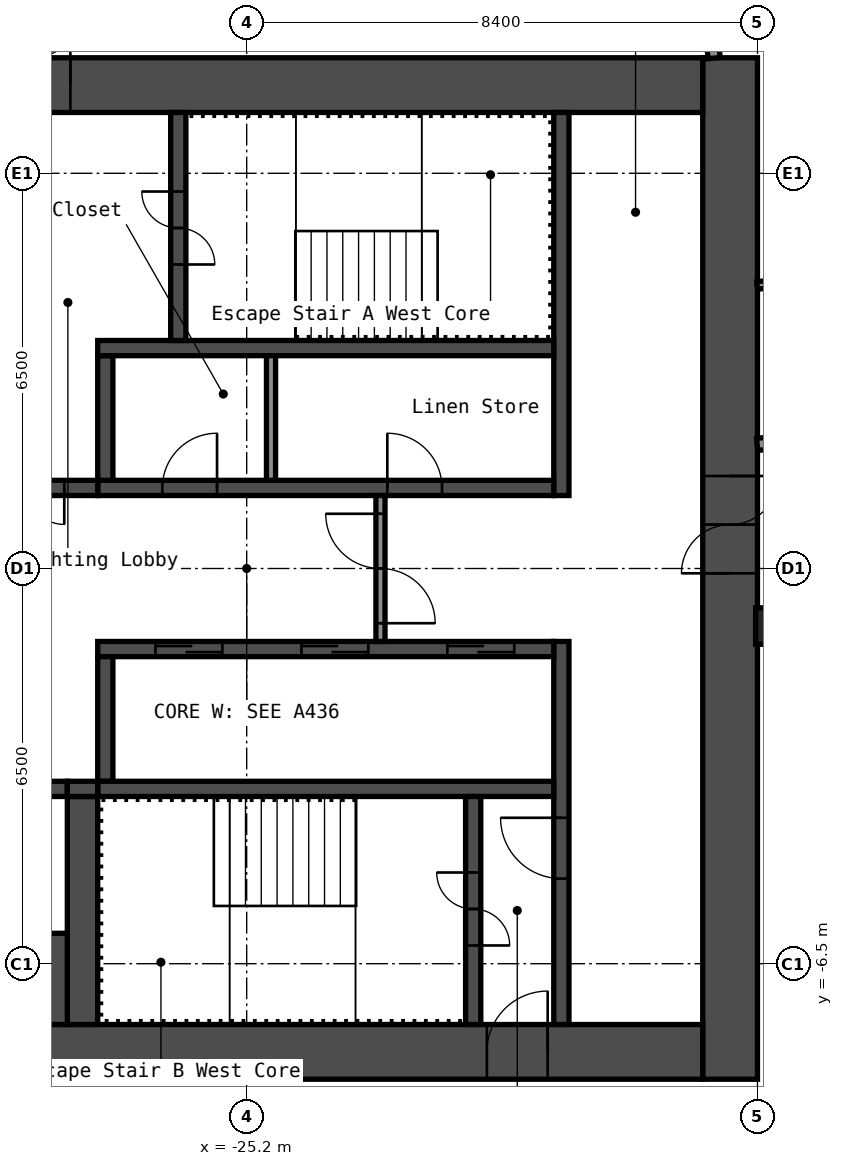
"""IFC4 building model, lengths in metres.
Left out: names, types, materials, properties, quantities, classifications, styles, units other than length and angle.
Written with IfcOpenShell. Run it as: python <this file> out.ifc"""

import sys

from ifc_helpers import new_model, si_unit, direction, frame, frame_2d, origin, origin_2d, place, context, subcontext, project, spatial, rectangle, hollow_rectangle, extrude, element, fill, save


model = new_model("IFC4")
c1 = context("Model", 3, precision=1e-05, world=origin(), true_north=direction((0.0, 1.0)))
c2 = subcontext(c1, "Body", "Model", "MODEL_VIEW")
j1 = project(units=[si_unit("LENGTHUNIT", "METRE"), si_unit("PLANEANGLEUNIT", "RADIAN")], contexts=[c1])
p1 = place(None, origin())
s1 = spatial("IfcSite", under=j1, at=p1, CompositionType="ELEMENT")
p2 = place(p1, origin())
s2 = spatial("IfcBuilding", under=s1, at=p2, CompositionType="ELEMENT")
p3 = place(p2, frame((0.0, 0.0, 255.0)))
s3 = spatial("IfcBuildingStorey", under=s2, at=p3, CompositionType="ELEMENT", Elevation=255.0)
p4 = place(p3, frame((-16.53, -0.947, 0.0), z_axis=(0.0, 0.0, 1.0), x_axis=(1.0, 0.0, 0.0)))
e1 = element("IfcColumn", 1, at=p4, inside=s3, PredefinedType="COLUMN", context=c2, shape_type="SweptSolid", body=[
    extrude(hollow_rectangle(XDim=0.6, YDim=0.6, WallThickness=0.025, InnerFilletRadius=0.038, OuterFilletRadius=0.062, at=origin_2d()), origin(), (0.0, 0.0, 1.0), 2.75),
])
p5 = place(p3, frame((-17.25, -8.4, 0.0), z_axis=(0.0, 0.0, 1.0), x_axis=(0.0, 1.0, 0.0)))
e2 = element("IfcWall", 2, at=p5, inside=s3, PredefinedType="SHEAR", context=c2, shape_type="SweptSolid", body=[
    extrude(rectangle(XDim=16.8, YDim=0.9, at=frame_2d((8.4, 0.0))), origin(), (0.0, 0.0, 1.0), 2.75),
])
p6 = place(p5, frame((8.321, 0.0, 0.0)))
e3 = element("IfcOpeningElement", 3, at=p6, cuts=e2, PredefinedType="OPENING", context=c2, shape_type="SweptSolid", body=[
    extrude(rectangle(XDim=1.6, YDim=2.1, at=frame_2d((0.8, 1.05))), frame((0.0, 0.46, 0.0), z_axis=(0.0, -1.0, 0.0), x_axis=(1.0, 0.0, 0.0)), (0.0, 0.0, 1.0), 0.92),
])
p7 = place(p3, frame((-32.7, 7.95, 0.0), z_axis=(0.0, 0.0, 1.0), x_axis=(1.0, 0.0, 0.0)))
e4 = element("IfcWall", 4, at=p7, inside=s3, PredefinedType="SHEAR", context=c2, shape_type="SweptSolid", body=[
    extrude(rectangle(XDim=15.0, YDim=0.9, at=frame_2d((7.5, 0.0))), origin(), (0.0, 0.0, 1.0), 2.75),
])
p8 = place(p7, frame((3.4, 0.0, 0.0)))
e5 = element("IfcOpeningElement", 5, at=p8, cuts=e4, PredefinedType="OPENING", context=c2, shape_type="SweptSolid", body=[
    extrude(rectangle(XDim=1.2, YDim=2.1, at=frame_2d((0.6, 1.05))), frame((0.0, 0.46, 0.0), z_axis=(0.0, -1.0, 0.0), x_axis=(1.0, 0.0, 0.0)), (0.0, 0.0, 1.0), 0.92),
])
p9 = place(p7, frame((0.75, 0.0, 0.0)))
e6 = element("IfcOpeningElement", 6, at=p9, cuts=e4, PredefinedType="OPENING", context=c2, shape_type="SweptSolid", body=[
    extrude(rectangle(XDim=0.9, YDim=2.1, at=frame_2d((0.45, 1.05))), frame((0.0, 0.46, 0.0), z_axis=(0.0, -1.0, 0.0), x_axis=(1.0, 0.0, 0.0)), (0.0, 0.0, 1.0), 0.92),
])
p10 = place(p3, frame((-32.7, -7.95, 0.0), z_axis=(0.0, 0.0, 1.0), x_axis=(1.0, 0.0, 0.0)))
e7 = element("IfcWall", 7, at=p10, inside=s3, PredefinedType="SHEAR", context=c2, shape_type="SweptSolid", body=[
    extrude(rectangle(XDim=15.0, YDim=0.9, at=frame_2d((7.5, 0.0))), origin(), (0.0, 0.0, 1.0), 2.75),
])
p11 = place(p10, frame((11.45, 0.0, 0.0)))
e8 = element("IfcOpeningElement", 8, at=p11, cuts=e7, PredefinedType="OPENING", context=c2, shape_type="SweptSolid", body=[
    extrude(rectangle(XDim=1.0, YDim=2.1, at=frame_2d((0.5, 1.05))), frame((0.0, 0.46, 0.0), z_axis=(0.0, -1.0, 0.0), x_axis=(1.0, 0.0, 0.0)), (0.0, 0.0, 1.0), 0.92),
])
p12 = place(p3, frame((-20.025, 1.2, 0.0), z_axis=(0.0, 0.0, 1.0), x_axis=(0.0, 1.0, 0.0)))
e9 = element("IfcWall", 9, at=p12, inside=s3, PredefinedType="SHEAR", context=c2, shape_type="SweptSolid", body=[
    extrude(rectangle(XDim=6.3, YDim=0.25, at=frame_2d((3.15, 0.0))), origin(), (0.0, 0.0, 1.0), 2.75),
])
p13 = place(p3, frame((-20.025, -7.5, 0.0), z_axis=(0.0, 0.0, 1.0), x_axis=(0.0, 1.0, 0.0)))
e10 = element("IfcWall", 10, at=p13, inside=s3, PredefinedType="SHEAR", context=c2, shape_type="SweptSolid", body=[
    extrude(rectangle(XDim=6.3, YDim=0.25, at=frame_2d((3.15, 0.0))), origin(), (0.0, 0.0, 1.0), 2.75),
])
p14 = place(p13, frame((2.4, 0.0, 0.0)))
e11 = element("IfcOpeningElement", 11, at=p14, cuts=e10, PredefinedType="OPENING", context=c2, shape_type="SweptSolid", body=[
    extrude(rectangle(XDim=1.0, YDim=2.1, at=frame_2d((0.5, 1.05))), frame((0.0, 0.135, 0.0), z_axis=(0.0, -1.0, 0.0), x_axis=(1.0, 0.0, 0.0)), (0.0, 0.0, 1.0), 0.27),
])
p15 = place(p3, frame((-27.65, 1.325, 0.0), z_axis=(0.0, 0.0, 1.0), x_axis=(1.0, 0.0, 0.0)))
e12 = element("IfcWall", 12, at=p15, inside=s3, PredefinedType="SHEAR", context=c2, shape_type="SweptSolid", body=[
    extrude(rectangle(XDim=7.5, YDim=0.25, at=frame_2d((3.75, 0.0))), origin(), (0.0, 0.0, 1.0), 2.75),
])
p16 = place(p15, frame((4.762, 0.0, 0.0)))
e13 = element("IfcOpeningElement", 13, at=p16, cuts=e12, PredefinedType="OPENING", context=c2, shape_type="SweptSolid", body=[
    extrude(rectangle(XDim=0.9, YDim=2.1, at=frame_2d((0.45, 1.05))), frame((0.0, 0.135, 0.0), z_axis=(0.0, -1.0, 0.0), x_axis=(1.0, 0.0, 0.0)), (0.0, 0.0, 1.0), 0.27),
])
p17 = place(p15, frame((1.062, 0.0, 0.0)))
e14 = element("IfcOpeningElement", 14, at=p17, cuts=e12, PredefinedType="OPENING", context=c2, shape_type="SweptSolid", body=[
    extrude(rectangle(XDim=0.9, YDim=2.1, at=frame_2d((0.45, 1.05))), frame((0.0, 0.135, 0.0), z_axis=(0.0, -1.0, 0.0), x_axis=(1.0, 0.0, 0.0)), (0.0, 0.0, 1.0), 0.27),
])
p18 = place(p3, frame((-27.525, 1.45, 0.0), z_axis=(0.0, 0.0, 1.0), x_axis=(0.0, 1.0, 0.0)))
e15 = element("IfcWall", 15, at=p18, inside=s3, PredefinedType="SHEAR", context=c2, shape_type="SweptSolid", body=[
    extrude(rectangle(XDim=2.05, YDim=0.25, at=frame_2d((1.025, 0.0))), origin(), (0.0, 0.0, 1.0), 2.75),
])
p19 = place(p3, frame((-27.65, 3.625, 0.0), z_axis=(0.0, 0.0, 1.0), x_axis=(1.0, 0.0, 0.0)))
e16 = element("IfcWall", 16, at=p19, inside=s3, PredefinedType="SHEAR", context=c2, shape_type="SweptSolid", body=[
    extrude(rectangle(XDim=7.5, YDim=0.25, at=frame_2d((3.75, 0.0))), origin(), (0.0, 0.0, 1.0), 2.75),
])
p20 = place(p3, frame((-26.325, 3.75, 0.0), z_axis=(0.0, 0.0, 1.0), x_axis=(0.0, 1.0, 0.0)))
e17 = element("IfcWall", 17, at=p20, inside=s3, PredefinedType="SHEAR", context=c2, shape_type="SweptSolid", body=[
    extrude(rectangle(XDim=3.75, YDim=0.25, at=frame_2d((1.875, 0.0))), origin(), (0.0, 0.0, 1.0), 2.75),
])
p21 = place(p20, frame((1.25, 0.0, 0.0)))
e18 = element("IfcOpeningElement", 18, at=p21, cuts=e17, PredefinedType="OPENING", context=c2, shape_type="SweptSolid", body=[
    extrude(rectangle(XDim=1.2, YDim=2.1, at=frame_2d((0.6, 1.05))), frame((0.0, 0.135, 0.0), z_axis=(0.0, -1.0, 0.0), x_axis=(1.0, 0.0, 0.0)), (0.0, 0.0, 1.0), 0.27),
])
p22 = place(p3, frame((-32.7, 1.325, 0.0), z_axis=(0.0, 0.0, 1.0), x_axis=(1.0, 0.0, 0.0)))
e19 = element("IfcWall", 19, at=p22, inside=s3, PredefinedType="SHEAR", context=c2, shape_type="SweptSolid", body=[
    extrude(rectangle(XDim=5.05, YDim=0.25, at=frame_2d((2.525, 0.0))), origin(), (0.0, 0.0, 1.0), 2.75),
])
p23 = place(p22, frame((3.3, 0.0, 0.0)))
e20 = element("IfcOpeningElement", 20, at=p23, cuts=e19, PredefinedType="OPENING", context=c2, shape_type="SweptSolid", body=[
    extrude(rectangle(XDim=1.2, YDim=2.1, at=frame_2d((0.6, 1.05))), frame((0.0, 0.135, 0.0), z_axis=(0.0, -1.0, 0.0), x_axis=(1.0, 0.0, 0.0)), (0.0, 0.0, 1.0), 0.27),
])
p24 = place(p3, frame((-27.65, -1.325, 0.0), z_axis=(0.0, 0.0, 1.0), x_axis=(1.0, 0.0, 0.0)))
e21 = element("IfcWall", 21, at=p24, inside=s3, PredefinedType="SHEAR", context=c2, shape_type="SweptSolid", body=[
    extrude(rectangle(XDim=7.5, YDim=0.25, at=frame_2d((3.75, 0.0))), origin(), (0.0, 0.0, 1.0), 2.75),
])
p25 = place(p24, frame((5.75, 0.0, 0.0)))
e22 = element("IfcOpeningElement", 22, at=p25, cuts=e21, PredefinedType="OPENING", context=c2, shape_type="SweptSolid", body=[
    extrude(rectangle(XDim=1.1, YDim=2.1, at=frame_2d((0.55, 1.05))), frame((0.0, 0.135, 0.0), z_axis=(0.0, -1.0, 0.0), x_axis=(1.0, 0.0, 0.0)), (0.0, 0.0, 1.0), 0.27),
])
p26 = place(p24, frame((3.35, 0.0, 0.0)))
e23 = element("IfcOpeningElement", 23, at=p26, cuts=e21, PredefinedType="OPENING", context=c2, shape_type="SweptSolid", body=[
    extrude(rectangle(XDim=1.1, YDim=2.1, at=frame_2d((0.55, 1.05))), frame((0.0, 0.135, 0.0), z_axis=(0.0, -1.0, 0.0), x_axis=(1.0, 0.0, 0.0)), (0.0, 0.0, 1.0), 0.27),
])
p27 = place(p24, frame((0.95, 0.0, 0.0)))
e24 = element("IfcOpeningElement", 24, at=p27, cuts=e21, PredefinedType="OPENING", context=c2, shape_type="SweptSolid", body=[
    extrude(rectangle(XDim=1.1, YDim=2.1, at=frame_2d((0.55, 1.05))), frame((0.0, 0.135, 0.0), z_axis=(0.0, -1.0, 0.0), x_axis=(1.0, 0.0, 0.0)), (0.0, 0.0, 1.0), 0.27),
])
p28 = place(p3, frame((-27.525, -3.5, 0.0), z_axis=(0.0, 0.0, 1.0), x_axis=(0.0, 1.0, 0.0)))
e25 = element("IfcWall", 25, at=p28, inside=s3, PredefinedType="SHEAR", context=c2, shape_type="SweptSolid", body=[
    extrude(rectangle(XDim=2.05, YDim=0.25, at=frame_2d((1.025, 0.0))), origin(), (0.0, 0.0, 1.0), 2.75),
])
p29 = place(p3, frame((-27.65, -3.625, 0.0), z_axis=(0.0, 0.0, 1.0), x_axis=(1.0, 0.0, 0.0)))
e26 = element("IfcWall", 26, at=p29, inside=s3, PredefinedType="SHEAR", context=c2, shape_type="SweptSolid", body=[
    extrude(rectangle(XDim=7.5, YDim=0.25, at=frame_2d((3.75, 0.0))), origin(), (0.0, 0.0, 1.0), 2.75),
])
p30 = place(p3, frame((-21.475, -7.5, 0.0), z_axis=(0.0, 0.0, 1.0), x_axis=(0.0, 1.0, 0.0)))
e27 = element("IfcWall", 27, at=p30, inside=s3, PredefinedType="SHEAR", context=c2, shape_type="SweptSolid", body=[
    extrude(rectangle(XDim=3.75, YDim=0.25, at=frame_2d((1.875, 0.0))), origin(), (0.0, 0.0, 1.0), 2.75),
])
p31 = place(p30, frame((1.3, 0.0, 0.0)))
e28 = element("IfcOpeningElement", 28, at=p31, cuts=e27, PredefinedType="OPENING", context=c2, shape_type="SweptSolid", body=[
    extrude(rectangle(XDim=1.2, YDim=2.1, at=frame_2d((0.6, 1.05))), frame((0.0, 0.135, 0.0), z_axis=(0.0, -1.0, 0.0), x_axis=(1.0, 0.0, 0.0)), (0.0, 0.0, 1.0), 0.27),
])
p32 = place(p3, frame((-27.9, -7.5, 0.0), z_axis=(0.0, 0.0, 1.0), x_axis=(0.0, 1.0, 0.0)))
e29 = element("IfcWall", 29, at=p32, inside=s3, PredefinedType="SHEAR", context=c2, shape_type="SweptSolid", body=[
    extrude(rectangle(XDim=3.75, YDim=0.5, at=frame_2d((1.875, 0.0))), origin(), (0.0, 0.0, 1.0), 2.75),
])
p33 = place(p3, frame((-32.7, -3.625, 0.0), z_axis=(0.0, 0.0, 1.0), x_axis=(1.0, 0.0, 0.0)))
e30 = element("IfcWall", 30, at=p33, inside=s3, PredefinedType="SHEAR", context=c2, shape_type="SweptSolid", body=[
    extrude(rectangle(XDim=4.55, YDim=0.25, at=frame_2d((2.275, 0.0))), origin(), (0.0, 0.0, 1.0), 2.75),
])
p34 = place(p33, frame((2.85, 0.0, 0.0)))
e31 = element("IfcOpeningElement", 31, at=p34, cuts=e30, PredefinedType="OPENING", context=c2, shape_type="SweptSolid", body=[
    extrude(rectangle(XDim=1.1, YDim=2.1, at=frame_2d((0.55, 1.05))), frame((0.0, 0.135, 0.0), z_axis=(0.0, -1.0, 0.0), x_axis=(1.0, 0.0, 0.0)), (0.0, 0.0, 1.0), 0.27),
])
p35 = place(p33, frame((0.6, 0.0, 0.0)))
e32 = element("IfcOpeningElement", 32, at=p35, cuts=e30, PredefinedType="OPENING", context=c2, shape_type="SweptSolid", body=[
    extrude(rectangle(XDim=1.1, YDim=2.1, at=frame_2d((0.55, 1.05))), frame((0.0, 0.135, 0.0), z_axis=(0.0, -1.0, 0.0), x_axis=(1.0, 0.0, 0.0)), (0.0, 0.0, 1.0), 0.27),
])
p36 = place(p3, frame((-32.7, -6.75, 0.0), z_axis=(0.0, 0.0, 1.0), x_axis=(1.0, 0.0, 0.0)))
e33 = element("IfcWall", 33, at=p36, inside=s3, PredefinedType="SHEAR", context=c2, shape_type="SweptSolid", body=[
    extrude(rectangle(XDim=4.55, YDim=1.5, at=frame_2d((2.275, 0.0))), origin(), (0.0, 0.0, 1.0), 2.75),
])
p37 = place(p3, frame((-28.15, -3.625, 0.0), z_axis=(0.0, 0.0, 1.0), x_axis=(1.0, 0.0, 0.0)))
e34 = element("IfcWall", 34, at=p37, inside=s3, PredefinedType="SHEAR", context=c2, shape_type="SweptSolid", body=[
    extrude(rectangle(XDim=0.5, YDim=0.25, at=frame_2d((0.25, 0.0))), origin(), (0.0, 0.0, 1.0), 2.75),
])
p38 = place(p3, frame((-23.0, -1.2, 0.0), z_axis=(0.0, 0.0, 1.0), x_axis=(0.0, 1.0, 0.0)))
e35 = element("IfcWall", 35, at=p38, inside=s3, PredefinedType="PARTITIONING", context=c2, shape_type="SweptSolid", body=[
    extrude(rectangle(XDim=2.4, YDim=0.15, at=frame_2d((1.2, 0.0))), origin(), (0.0, 0.0, 1.0), 2.75),
])
p39 = place(p38, frame((0.3, 0.0, 0.0)))
e36 = element("IfcOpeningElement", 36, at=p39, cuts=e35, PredefinedType="OPENING", context=c2, shape_type="SweptSolid", body=[
    extrude(rectangle(XDim=1.8, YDim=2.1, at=frame_2d((0.9, 1.05))), frame((0.0, 0.085, 0.0), z_axis=(0.0, -1.0, 0.0), x_axis=(1.0, 0.0, 0.0)), (0.0, 0.0, 1.0), 0.17),
])
p40 = place(p3, frame((-24.8, 1.45, 0.0), z_axis=(0.0, 0.0, 1.0), x_axis=(0.0, 1.0, 0.0)))
e37 = element("IfcWall", 37, at=p40, inside=s3, PredefinedType="PARTITIONING", context=c2, shape_type="SweptSolid", body=[
    extrude(rectangle(XDim=2.05, YDim=0.15, at=frame_2d((1.025, 0.0))), origin(), (0.0, 0.0, 1.0), 2.75),
])
p41 = place(p3, frame((-16.805, 2.041, 0.0), z_axis=(0.0, 0.0, 1.0), x_axis=(0.994521146831, 0.104535584879, 0.0)))
e38 = element("IfcWall", 38, at=p41, inside=s3, PredefinedType="PARTITIONING", context=c2, shape_type="SweptSolid", body=[
    extrude(rectangle(XDim=33.561, YDim=0.2, at=frame_2d((16.78, 0.0))), origin(), (0.0, 0.0, 1.0), 2.75),
])
p42 = place(p41, frame((4.161, 0.0, 0.0)))
e39 = element("IfcOpeningElement", 39, at=p42, cuts=e38, PredefinedType="OPENING", context=c2, shape_type="SweptSolid", body=[
    extrude(rectangle(XDim=1.6, YDim=2.1, at=frame_2d((0.8, 1.05))), frame((0.0, 0.11, 0.0), z_axis=(0.0, -1.0, 0.0), x_axis=(1.0, 0.0, 0.0)), (0.0, 0.0, 1.0), 0.22),
])
p43 = place(p41, frame((10.431, 0.0, 0.0)))
e40 = element("IfcOpeningElement", 40, at=p43, cuts=e38, PredefinedType="OPENING", context=c2, shape_type="SweptSolid", body=[
    extrude(rectangle(XDim=0.9, YDim=2.1, at=frame_2d((0.45, 1.05))), frame((0.0, 0.11, 0.0), z_axis=(0.0, -1.0, 0.0), x_axis=(1.0, 0.0, 0.0)), (0.0, 0.0, 1.0), 0.22),
])
p44 = place(p41, frame((14.631, 0.0, 0.0)))
e41 = element("IfcOpeningElement", 41, at=p44, cuts=e38, PredefinedType="OPENING", context=c2, shape_type="SweptSolid", body=[
    extrude(rectangle(XDim=0.9, YDim=2.1, at=frame_2d((0.45, 1.05))), frame((0.0, 0.11, 0.0), z_axis=(0.0, -1.0, 0.0), x_axis=(1.0, 0.0, 0.0)), (0.0, 0.0, 1.0), 0.22),
])
p45 = place(p41, frame((19.611, 0.0, 0.0)))
e42 = element("IfcOpeningElement", 42, at=p45, cuts=e38, PredefinedType="OPENING", context=c2, shape_type="SweptSolid", body=[
    extrude(rectangle(XDim=1.0, YDim=2.1, at=frame_2d((0.5, 1.05))), frame((0.0, 0.11, 0.0), z_axis=(0.0, -1.0, 0.0), x_axis=(1.0, 0.0, 0.0)), (0.0, 0.0, 1.0), 0.22),
])
p46 = place(p41, frame((21.311, 0.0, 0.0)))
e43 = element("IfcOpeningElement", 43, at=p46, cuts=e38, PredefinedType="OPENING", context=c2, shape_type="SweptSolid", body=[
    extrude(rectangle(XDim=1.0, YDim=2.1, at=frame_2d((0.5, 1.05))), frame((0.0, 0.11, 0.0), z_axis=(0.0, -1.0, 0.0), x_axis=(1.0, 0.0, 0.0)), (0.0, 0.0, 1.0), 0.22),
])
p47 = place(p41, frame((26.221, 0.0, 0.0)))
e44 = element("IfcOpeningElement", 44, at=p47, cuts=e38, PredefinedType="OPENING", context=c2, shape_type="SweptSolid", body=[
    extrude(rectangle(XDim=0.9, YDim=2.1, at=frame_2d((0.45, 1.05))), frame((0.0, 0.11, 0.0), z_axis=(0.0, -1.0, 0.0), x_axis=(1.0, 0.0, 0.0)), (0.0, 0.0, 1.0), 0.22),
])
p48 = place(p41, frame((30.421, 0.0, 0.0)))
e45 = element("IfcOpeningElement", 45, at=p48, cuts=e38, PredefinedType="OPENING", context=c2, shape_type="SweptSolid", body=[
    extrude(rectangle(XDim=0.9, YDim=2.1, at=frame_2d((0.45, 1.05))), frame((0.0, 0.11, 0.0), z_axis=(0.0, -1.0, 0.0), x_axis=(1.0, 0.0, 0.0)), (0.0, 0.0, 1.0), 0.22),
])
p49 = place(p3, frame((-16.805, 4.655, 0.0), z_axis=(0.0, 0.0, 1.0), x_axis=(0.994521955988, 0.104527886512, 0.0)))
e46 = element("IfcWall", 46, at=p49, inside=s3, PredefinedType="PARTITIONING", context=c2, shape_type="SweptSolid", body=[
    extrude(rectangle(XDim=2.025, YDim=0.125, at=frame_2d((1.012, 0.0))), origin(), (0.0, 0.0, 1.0), 2.75),
])
p50 = place(p3, frame((-17.512, 8.395, 0.0), z_axis=(0.0, 0.0, 1.0), x_axis=(-0.104524714473, 0.994522289375, 0.0)))
e47 = element("IfcWall", 47, at=p50, inside=s3, PredefinedType="PARTITIONING", context=c2, shape_type="SweptSolid", body=[
    extrude(rectangle(XDim=9.607, YDim=0.2, at=frame_2d((4.803, 0.0))), origin(), (0.0, 0.0, 1.0), 2.75),
])
p51 = place(p6, origin())
e48 = element("IfcDoor", 48, at=p51, inside=s3, OperationType="DOUBLE_DOOR_SINGLE_SWING", PredefinedType="DOOR", context=c2, shape_type="SweptSolid", body=[
    extrude(rectangle(XDim=1.6, YDim=2.1, at=frame_2d((0.8, 1.05))), frame((0.0, 0.025, 0.0), z_axis=(0.0, -1.0, 0.0), x_axis=(1.0, 0.0, 0.0)), (0.0, 0.0, 1.0), 0.05),
])
fill(e3, e48)
p52 = place(p8, origin())
e49 = element("IfcDoor", 49, at=p52, inside=s3, OperationType="DOUBLE_DOOR_SINGLE_SWING", PredefinedType="DOOR", context=c2, shape_type="SweptSolid", body=[
    extrude(rectangle(XDim=1.2, YDim=2.1, at=frame_2d((0.6, 1.05))), frame((0.0, 0.025, 0.0), z_axis=(0.0, -1.0, 0.0), x_axis=(1.0, 0.0, 0.0)), (0.0, 0.0, 1.0), 0.05),
])
fill(e5, e49)
p53 = place(p11, origin())
e50 = element("IfcDoor", 50, at=p53, inside=s3, OperationType="SINGLE_SWING_LEFT", PredefinedType="DOOR", context=c2, shape_type="SweptSolid", body=[
    extrude(rectangle(XDim=1.0, YDim=2.1, at=frame_2d((0.5, 1.05))), frame((0.0, 0.025, 0.0), z_axis=(0.0, -1.0, 0.0), x_axis=(1.0, 0.0, 0.0)), (0.0, 0.0, 1.0), 0.05),
])
fill(e8, e50)
p54 = place(p21, origin())
e51 = element("IfcDoor", 51, at=p54, inside=s3, OperationType="DOUBLE_DOOR_SINGLE_SWING", PredefinedType="DOOR", context=c2, shape_type="SweptSolid", body=[
    extrude(rectangle(XDim=1.2, YDim=2.1, at=frame_2d((0.6, 1.05))), frame((0.0, 0.025, 0.0), z_axis=(0.0, -1.0, 0.0), x_axis=(1.0, 0.0, 0.0)), (0.0, 0.0, 1.0), 0.05),
])
fill(e18, e51)
p55 = place(p31, origin())
e52 = element("IfcDoor", 52, at=p55, inside=s3, OperationType="DOUBLE_DOOR_SINGLE_SWING", PredefinedType="DOOR", context=c2, shape_type="SweptSolid", body=[
    extrude(rectangle(XDim=1.2, YDim=2.1, at=frame_2d((0.6, 1.05))), frame((0.0, 0.025, 0.0), z_axis=(0.0, -1.0, 0.0), x_axis=(1.0, 0.0, 0.0)), (0.0, 0.0, 1.0), 0.05),
])
fill(e28, e52)
p56 = place(p14, origin())
e53 = element("IfcDoor", 53, at=p56, inside=s3, OperationType="SINGLE_SWING_LEFT", PredefinedType="DOOR", context=c2, shape_type="SweptSolid", body=[
    extrude(rectangle(XDim=1.0, YDim=2.1, at=frame_2d((0.5, 1.05))), frame((0.0, 0.025, 0.0), z_axis=(0.0, -1.0, 0.0), x_axis=(1.0, 0.0, 0.0)), (0.0, 0.0, 1.0), 0.05),
])
fill(e11, e53)
p57 = place(p23, origin())
e54 = element("IfcDoor", 54, at=p57, inside=s3, OperationType="DOUBLE_DOOR_SINGLE_SWING", PredefinedType="DOOR", context=c2, shape_type="SweptSolid", body=[
    extrude(rectangle(XDim=1.2, YDim=2.1, at=frame_2d((0.6, 1.05))), frame((0.0, 0.025, 0.0), z_axis=(0.0, -1.0, 0.0), x_axis=(1.0, 0.0, 0.0)), (0.0, 0.0, 1.0), 0.05),
])
fill(e20, e54)
p58 = place(p39, origin())
e55 = element("IfcDoor", 55, at=p58, inside=s3, OperationType="DOUBLE_DOOR_SINGLE_SWING", PredefinedType="DOOR", context=c2, shape_type="SweptSolid", body=[
    extrude(rectangle(XDim=1.8, YDim=2.1, at=frame_2d((0.9, 1.05))), frame((0.0, 0.025, 0.0), z_axis=(0.0, -1.0, 0.0), x_axis=(1.0, 0.0, 0.0)), (0.0, 0.0, 1.0), 0.05),
])
fill(e36, e55)
p59 = place(p16, origin())
e56 = element("IfcDoor", 56, at=p59, inside=s3, OperationType="SINGLE_SWING_RIGHT", PredefinedType="DOOR", context=c2, shape_type="SweptSolid", body=[
    extrude(rectangle(XDim=0.9, YDim=2.1, at=frame_2d((0.45, 1.05))), frame((0.0, 0.025, 0.0), z_axis=(0.0, -1.0, 0.0), x_axis=(1.0, 0.0, 0.0)), (0.0, 0.0, 1.0), 0.05),
])
fill(e13, e56)
p60 = place(p17, origin())
e57 = element("IfcDoor", 57, at=p60, inside=s3, OperationType="SINGLE_SWING_LEFT", PredefinedType="DOOR", context=c2, shape_type="SweptSolid", body=[
    extrude(rectangle(XDim=0.9, YDim=2.1, at=frame_2d((0.45, 1.05))), frame((0.0, 0.025, 0.0), z_axis=(0.0, -1.0, 0.0), x_axis=(1.0, 0.0, 0.0)), (0.0, 0.0, 1.0), 0.05),
])
fill(e14, e57)
p61 = place(p25, origin())
e58 = element("IfcDoor", 58, at=p61, inside=s3, OperationType="DOUBLE_DOOR_SLIDING", PredefinedType="DOOR", context=c2, shape_type="SweptSolid", body=[
    extrude(rectangle(XDim=1.1, YDim=2.1, at=frame_2d((0.55, 1.05))), frame((0.0, 0.025, 0.0), z_axis=(0.0, -1.0, 0.0), x_axis=(1.0, 0.0, 0.0)), (0.0, 0.0, 1.0), 0.05),
])
fill(e22, e58)
p62 = place(p26, origin())
e59 = element("IfcDoor", 59, at=p62, inside=s3, OperationType="DOUBLE_DOOR_SLIDING", PredefinedType="DOOR", context=c2, shape_type="SweptSolid", body=[
    extrude(rectangle(XDim=1.1, YDim=2.1, at=frame_2d((0.55, 1.05))), frame((0.0, 0.025, 0.0), z_axis=(0.0, -1.0, 0.0), x_axis=(1.0, 0.0, 0.0)), (0.0, 0.0, 1.0), 0.05),
])
fill(e23, e59)
p63 = place(p27, origin())
e60 = element("IfcDoor", 60, at=p63, inside=s3, OperationType="DOUBLE_DOOR_SLIDING", PredefinedType="DOOR", context=c2, shape_type="SweptSolid", body=[
    extrude(rectangle(XDim=1.1, YDim=2.1, at=frame_2d((0.55, 1.05))), frame((0.0, 0.025, 0.0), z_axis=(0.0, -1.0, 0.0), x_axis=(1.0, 0.0, 0.0)), (0.0, 0.0, 1.0), 0.05),
])
fill(e24, e60)
save(model, sys.argv[1])
